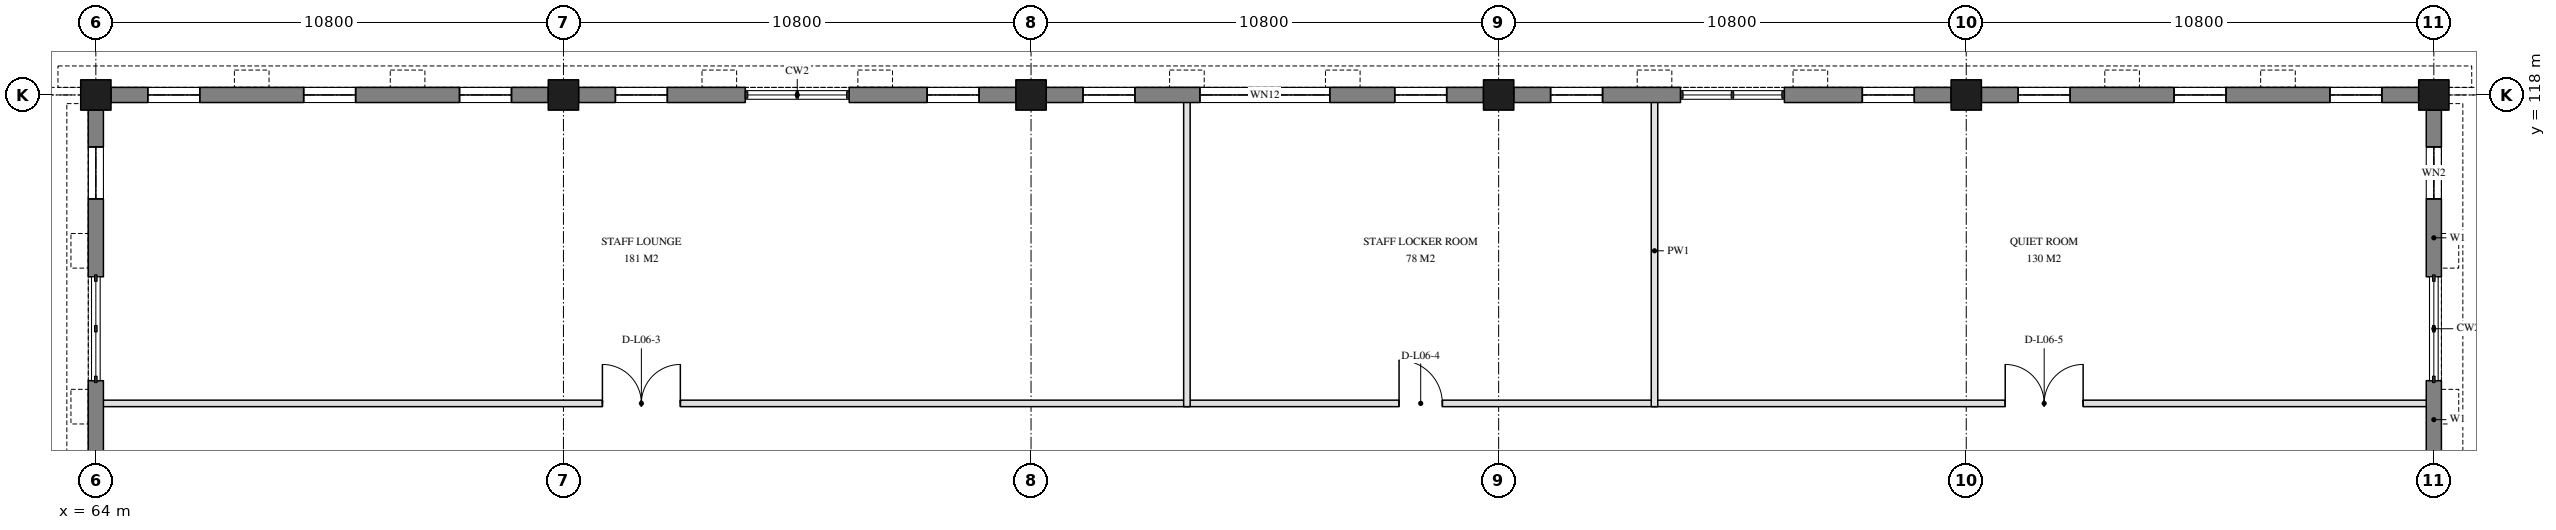
"""IFC4 building model, lengths in metres.
Left out: names, types, materials, properties, quantities, classifications, styles, units other than length and angle.
Written with IfcOpenShell. Run it as: python <this file> out.ifc"""

import sys

from ifc_helpers import new_model, si_unit, direction, frame, frame_2d, origin, origin_2d, place, context, subcontext, project, spatial, rectangle, extrude, element, fill, save


model = new_model("IFC4")
c1 = context("Model", 3, precision=1e-05, world=origin(), true_north=direction((0.0, 1.0)))
c2 = subcontext(c1, "Body", "Model", "MODEL_VIEW")
j1 = project(units=[si_unit("LENGTHUNIT", "METRE"), si_unit("PLANEANGLEUNIT", "RADIAN")], contexts=[c1])
p1 = place(None, origin())
s1 = spatial("IfcSite", under=j1, at=p1, CompositionType="ELEMENT")
p2 = place(p1, origin())
s2 = spatial("IfcBuilding", under=s1, at=p2, CompositionType="ELEMENT")
p3 = place(p2, frame((0.0, 0.0, 24.3)))
s3 = spatial("IfcBuildingStorey", under=s2, at=p3, CompositionType="ELEMENT", Elevation=24.3)
for number, where, z_axis, x_axis in (
    (1, (64.0, 118.0, 0.0), (0.0, 0.0, 1.0), (1.0, 0.0, 0.0)),
    (2, (74.8, 118.0, 0.0), (0.0, 0.0, 1.0), (1.0, 0.0, 0.0)),
    (3, (85.6, 118.0, 0.0), (0.0, 0.0, 1.0), (1.0, 0.0, 0.0)),
    (4, (96.4, 118.0, 0.0), (0.0, 0.0, 1.0), (1.0, 0.0, 0.0)),
    (5, (107.2, 118.0, 0.0), (0.0, 0.0, 1.0), (1.0, 0.0, 0.0)),
    (6, (118.0, 118.0, 0.0), (0.0, 0.0, 1.0), (1.0, 0.0, 0.0)),
):
    element("IfcColumn", number, at=place(p3, frame(where, z_axis=z_axis, x_axis=x_axis)), inside=s3, PredefinedType="COLUMN", context=c2, shape_type="SweptSolid", body=[
        extrude(rectangle(XDim=0.7, YDim=0.7, at=origin_2d()), origin(), (0.0, 0.0, 1.0), 3.9),
    ])
p4 = place(p3, frame((64.35, 118.0, 0.0), z_axis=(0.0, 0.0, 1.0), x_axis=(1.0, 0.0, 0.0)))
e7 = element("IfcWall", 7, at=p4, inside=s3, PredefinedType="SOLIDWALL", context=c2, shape_type="SweptSolid", body=[
    extrude(rectangle(XDim=10.1, YDim=0.35, at=frame_2d((5.05, 0.0))), origin(), (0.0, 0.0, 1.0), 2.95),
])
p5 = place(p4, frame((0.85, 0.0, 0.9)))
e8 = element("IfcOpeningElement", 8, at=p5, cuts=e7, PredefinedType="OPENING", context=c2, shape_type="SweptSolid", body=[
    extrude(rectangle(XDim=1.2, YDim=1.2, at=frame_2d((0.6, 0.6))), frame((0.0, 0.185, 0.0), z_axis=(0.0, -1.0, 0.0), x_axis=(1.0, 0.0, 0.0)), (0.0, 0.0, 1.0), 0.37),
])
p6 = place(p4, frame((4.45, 0.0, 0.9)))
e9 = element("IfcOpeningElement", 9, at=p6, cuts=e7, PredefinedType="OPENING", context=c2, shape_type="SweptSolid", body=[
    extrude(rectangle(XDim=1.2, YDim=1.2, at=frame_2d((0.6, 0.6))), frame((0.0, 0.185, 0.0), z_axis=(0.0, -1.0, 0.0), x_axis=(1.0, 0.0, 0.0)), (0.0, 0.0, 1.0), 0.37),
])
p7 = place(p4, frame((8.05, 0.0, 0.9)))
e10 = element("IfcOpeningElement", 10, at=p7, cuts=e7, PredefinedType="OPENING", context=c2, shape_type="SweptSolid", body=[
    extrude(rectangle(XDim=1.2, YDim=1.2, at=frame_2d((0.6, 0.6))), frame((0.0, 0.185, 0.0), z_axis=(0.0, -1.0, 0.0), x_axis=(1.0, 0.0, 0.0)), (0.0, 0.0, 1.0), 0.37),
])
p8 = place(p3, frame((75.15, 118.0, 0.0), z_axis=(0.0, 0.0, 1.0), x_axis=(1.0, 0.0, 0.0)))
e11 = element("IfcWall", 11, at=p8, inside=s3, PredefinedType="SOLIDWALL", context=c2, shape_type="SweptSolid", body=[
    extrude(rectangle(XDim=3.85, YDim=0.35, at=frame_2d((1.925, 0.0))), origin(), (0.0, 0.0, 1.0), 2.95),
])
p9 = place(p8, frame((0.85, 0.0, 0.9)))
e12 = element("IfcOpeningElement", 12, at=p9, cuts=e11, PredefinedType="OPENING", context=c2, shape_type="SweptSolid", body=[
    extrude(rectangle(XDim=1.2, YDim=1.2, at=frame_2d((0.6, 0.6))), frame((0.0, 0.185, 0.0), z_axis=(0.0, -1.0, 0.0), x_axis=(1.0, 0.0, 0.0)), (0.0, 0.0, 1.0), 0.37),
])
p10 = place(p3, frame((81.4, 118.0, 0.0), z_axis=(0.0, 0.0, 1.0), x_axis=(1.0, 0.0, 0.0)))
e13 = element("IfcWall", 13, at=p10, inside=s3, PredefinedType="SOLIDWALL", context=c2, shape_type="SweptSolid", body=[
    extrude(rectangle(XDim=3.85, YDim=0.35, at=frame_2d((1.925, 0.0))), origin(), (0.0, 0.0, 1.0), 2.95),
])
p11 = place(p10, frame((1.8, 0.0, 0.9)))
e14 = element("IfcOpeningElement", 14, at=p11, cuts=e13, PredefinedType="OPENING", context=c2, shape_type="SweptSolid", body=[
    extrude(rectangle(XDim=1.2, YDim=1.2, at=frame_2d((0.6, 0.6))), frame((0.0, 0.185, 0.0), z_axis=(0.0, -1.0, 0.0), x_axis=(1.0, 0.0, 0.0)), (0.0, 0.0, 1.0), 0.37),
])
p12 = place(p3, frame((85.95, 118.0, 0.0), z_axis=(0.0, 0.0, 1.0), x_axis=(1.0, 0.0, 0.0)))
e15 = element("IfcWall", 15, at=p12, inside=s3, PredefinedType="SOLIDWALL", context=c2, shape_type="SweptSolid", body=[
    extrude(rectangle(XDim=10.1, YDim=0.35, at=frame_2d((5.05, 0.0))), origin(), (0.0, 0.0, 1.0), 2.95),
])
p13 = place(p12, frame((0.85, 0.0, 0.9)))
e16 = element("IfcOpeningElement", 16, at=p13, cuts=e15, PredefinedType="OPENING", context=c2, shape_type="SweptSolid", body=[
    extrude(rectangle(XDim=1.2, YDim=1.2, at=frame_2d((0.6, 0.6))), frame((0.0, 0.185, 0.0), z_axis=(0.0, -1.0, 0.0), x_axis=(1.0, 0.0, 0.0)), (0.0, 0.0, 1.0), 0.37),
])
p14 = place(p12, frame((3.55, 0.0, 0.9)))
e17 = element("IfcOpeningElement", 17, at=p14, cuts=e15, PredefinedType="OPENING", context=c2, shape_type="SweptSolid", body=[
    extrude(rectangle(XDim=3.0, YDim=1.2, at=frame_2d((1.5, 0.6))), frame((0.0, 0.185, 0.0), z_axis=(0.0, -1.0, 0.0), x_axis=(1.0, 0.0, 0.0)), (0.0, 0.0, 1.0), 0.37),
])
p15 = place(p12, frame((8.05, 0.0, 0.9)))
e18 = element("IfcOpeningElement", 18, at=p15, cuts=e15, PredefinedType="OPENING", context=c2, shape_type="SweptSolid", body=[
    extrude(rectangle(XDim=1.2, YDim=1.2, at=frame_2d((0.6, 0.6))), frame((0.0, 0.185, 0.0), z_axis=(0.0, -1.0, 0.0), x_axis=(1.0, 0.0, 0.0)), (0.0, 0.0, 1.0), 0.37),
])
p16 = place(p3, frame((96.75, 118.0, 0.0), z_axis=(0.0, 0.0, 1.0), x_axis=(1.0, 0.0, 0.0)))
e19 = element("IfcWall", 19, at=p16, inside=s3, PredefinedType="SOLIDWALL", context=c2, shape_type="SweptSolid", body=[
    extrude(rectangle(XDim=3.85, YDim=0.35, at=frame_2d((1.925, 0.0))), origin(), (0.0, 0.0, 1.0), 2.95),
])
p17 = place(p16, frame((0.85, 0.0, 0.9)))
e20 = element("IfcOpeningElement", 20, at=p17, cuts=e19, PredefinedType="OPENING", context=c2, shape_type="SweptSolid", body=[
    extrude(rectangle(XDim=1.2, YDim=1.2, at=frame_2d((0.6, 0.6))), frame((0.0, 0.185, 0.0), z_axis=(0.0, -1.0, 0.0), x_axis=(1.0, 0.0, 0.0)), (0.0, 0.0, 1.0), 0.37),
])
p18 = place(p3, frame((103.0, 118.0, 0.0), z_axis=(0.0, 0.0, 1.0), x_axis=(1.0, 0.0, 0.0)))
e21 = element("IfcWall", 21, at=p18, inside=s3, PredefinedType="SOLIDWALL", context=c2, shape_type="SweptSolid", body=[
    extrude(rectangle(XDim=3.85, YDim=0.35, at=frame_2d((1.925, 0.0))), origin(), (0.0, 0.0, 1.0), 2.95),
])
p19 = place(p18, frame((1.8, 0.0, 0.9)))
e22 = element("IfcOpeningElement", 22, at=p19, cuts=e21, PredefinedType="OPENING", context=c2, shape_type="SweptSolid", body=[
    extrude(rectangle(XDim=1.2, YDim=1.2, at=frame_2d((0.6, 0.6))), frame((0.0, 0.185, 0.0), z_axis=(0.0, -1.0, 0.0), x_axis=(1.0, 0.0, 0.0)), (0.0, 0.0, 1.0), 0.37),
])
p20 = place(p3, frame((107.55, 118.0, 0.0), z_axis=(0.0, 0.0, 1.0), x_axis=(1.0, 0.0, 0.0)))
e23 = element("IfcWall", 23, at=p20, inside=s3, PredefinedType="SOLIDWALL", context=c2, shape_type="SweptSolid", body=[
    extrude(rectangle(XDim=10.1, YDim=0.35, at=frame_2d((5.05, 0.0))), origin(), (0.0, 0.0, 1.0), 2.95),
])
p21 = place(p20, frame((0.85, 0.0, 0.9)))
e24 = element("IfcOpeningElement", 24, at=p21, cuts=e23, PredefinedType="OPENING", context=c2, shape_type="SweptSolid", body=[
    extrude(rectangle(XDim=1.2, YDim=1.2, at=frame_2d((0.6, 0.6))), frame((0.0, 0.185, 0.0), z_axis=(0.0, -1.0, 0.0), x_axis=(1.0, 0.0, 0.0)), (0.0, 0.0, 1.0), 0.37),
])
p22 = place(p20, frame((4.45, 0.0, 0.9)))
e25 = element("IfcOpeningElement", 25, at=p22, cuts=e23, PredefinedType="OPENING", context=c2, shape_type="SweptSolid", body=[
    extrude(rectangle(XDim=1.2, YDim=1.2, at=frame_2d((0.6, 0.6))), frame((0.0, 0.185, 0.0), z_axis=(0.0, -1.0, 0.0), x_axis=(1.0, 0.0, 0.0)), (0.0, 0.0, 1.0), 0.37),
])
p23 = place(p20, frame((8.05, 0.0, 0.9)))
e26 = element("IfcOpeningElement", 26, at=p23, cuts=e23, PredefinedType="OPENING", context=c2, shape_type="SweptSolid", body=[
    extrude(rectangle(XDim=1.2, YDim=1.2, at=frame_2d((0.6, 0.6))), frame((0.0, 0.185, 0.0), z_axis=(0.0, -1.0, 0.0), x_axis=(1.0, 0.0, 0.0)), (0.0, 0.0, 1.0), 0.37),
])
p24 = place(p3, frame((64.0, 107.55, 0.0), z_axis=(0.0, 0.0, 1.0), x_axis=(0.0, 1.0, 0.0)))
e27 = element("IfcWall", 27, at=p24, inside=s3, PredefinedType="SOLIDWALL", context=c2, shape_type="SweptSolid", body=[
    extrude(rectangle(XDim=3.85, YDim=0.35, at=frame_2d((1.925, 0.0))), origin(), (0.0, 0.0, 1.0), 2.95),
])
p25 = place(p24, frame((0.85, 0.0, 0.9)))
e28 = element("IfcOpeningElement", 28, at=p25, cuts=e27, PredefinedType="OPENING", context=c2, shape_type="SweptSolid", body=[
    extrude(rectangle(XDim=1.2, YDim=1.2, at=frame_2d((0.6, 0.6))), frame((0.0, 0.185, 0.0), z_axis=(0.0, -1.0, 0.0), x_axis=(1.0, 0.0, 0.0)), (0.0, 0.0, 1.0), 0.37),
])
p26 = place(p3, frame((64.0, 113.8, 0.0), z_axis=(0.0, 0.0, 1.0), x_axis=(0.0, 1.0, 0.0)))
e29 = element("IfcWall", 29, at=p26, inside=s3, PredefinedType="SOLIDWALL", context=c2, shape_type="SweptSolid", body=[
    extrude(rectangle(XDim=3.85, YDim=0.35, at=frame_2d((1.925, 0.0))), origin(), (0.0, 0.0, 1.0), 2.95),
])
p27 = place(p26, frame((1.8, 0.0, 0.9)))
e30 = element("IfcOpeningElement", 30, at=p27, cuts=e29, PredefinedType="OPENING", context=c2, shape_type="SweptSolid", body=[
    extrude(rectangle(XDim=1.2, YDim=1.2, at=frame_2d((0.6, 0.6))), frame((0.0, 0.185, 0.0), z_axis=(0.0, -1.0, 0.0), x_axis=(1.0, 0.0, 0.0)), (0.0, 0.0, 1.0), 0.37),
])
p28 = place(p3, frame((118.0, 107.55, 0.0), z_axis=(0.0, 0.0, 1.0), x_axis=(0.0, 1.0, 0.0)))
e31 = element("IfcWall", 31, at=p28, inside=s3, PredefinedType="SOLIDWALL", context=c2, shape_type="SweptSolid", body=[
    extrude(rectangle(XDim=3.85, YDim=0.35, at=frame_2d((1.925, 0.0))), origin(), (0.0, 0.0, 1.0), 2.95),
])
p29 = place(p28, frame((0.85, 0.0, 0.9)))
e32 = element("IfcOpeningElement", 32, at=p29, cuts=e31, PredefinedType="OPENING", context=c2, shape_type="SweptSolid", body=[
    extrude(rectangle(XDim=1.2, YDim=1.2, at=frame_2d((0.6, 0.6))), frame((0.0, 0.185, 0.0), z_axis=(0.0, -1.0, 0.0), x_axis=(1.0, 0.0, 0.0)), (0.0, 0.0, 1.0), 0.37),
])
p30 = place(p3, frame((118.0, 113.8, 0.0), z_axis=(0.0, 0.0, 1.0), x_axis=(0.0, 1.0, 0.0)))
e33 = element("IfcWall", 33, at=p30, inside=s3, PredefinedType="SOLIDWALL", context=c2, shape_type="SweptSolid", body=[
    extrude(rectangle(XDim=3.85, YDim=0.35, at=frame_2d((1.925, 0.0))), origin(), (0.0, 0.0, 1.0), 2.95),
])
p31 = place(p30, frame((1.8, 0.0, 0.9)))
e34 = element("IfcOpeningElement", 34, at=p31, cuts=e33, PredefinedType="OPENING", context=c2, shape_type="SweptSolid", body=[
    extrude(rectangle(XDim=1.2, YDim=1.2, at=frame_2d((0.6, 0.6))), frame((0.0, 0.185, 0.0), z_axis=(0.0, -1.0, 0.0), x_axis=(1.0, 0.0, 0.0)), (0.0, 0.0, 1.0), 0.37),
])
p32 = place(p3, frame((64.0, 110.875, 0.0), z_axis=(0.0, 0.0, 1.0), x_axis=(1.0, 0.0, 0.0)))
e35 = element("IfcWall", 35, at=p32, inside=s3, PredefinedType="PARTITIONING", context=c2, shape_type="SweptSolid", body=[
    extrude(rectangle(XDim=25.2, YDim=0.15, at=frame_2d((12.6, 0.0))), origin(), (0.0, 0.0, 1.0), 2.95),
])
p33 = place(p32, frame((11.7, 0.0, 0.0)))
e36 = element("IfcOpeningElement", 36, at=p33, cuts=e35, PredefinedType="OPENING", context=c2, shape_type="SweptSolid", body=[
    extrude(rectangle(XDim=1.8, YDim=2.1, at=frame_2d((0.9, 1.05))), frame((0.0, 0.085, 0.0), z_axis=(0.0, -1.0, 0.0), x_axis=(1.0, 0.0, 0.0)), (0.0, 0.0, 1.0), 0.17),
])
p34 = place(p3, frame((89.2, 110.875, 0.0), z_axis=(0.0, 0.0, 1.0), x_axis=(1.0, 0.0, 0.0)))
e37 = element("IfcWall", 37, at=p34, inside=s3, PredefinedType="PARTITIONING", context=c2, shape_type="SweptSolid", body=[
    extrude(rectangle(XDim=10.8, YDim=0.15, at=frame_2d((5.4, 0.0))), origin(), (0.0, 0.0, 1.0), 3.235),
])
p35 = place(p34, frame((4.9, 0.0, 0.0)))
e38 = element("IfcOpeningElement", 38, at=p35, cuts=e37, PredefinedType="OPENING", context=c2, shape_type="SweptSolid", body=[
    extrude(rectangle(XDim=1.0, YDim=2.1, at=frame_2d((0.5, 1.05))), frame((0.0, 0.085, 0.0), z_axis=(0.0, -1.0, 0.0), x_axis=(1.0, 0.0, 0.0)), (0.0, 0.0, 1.0), 0.17),
])
p36 = place(p3, frame((100.0, 110.875, 0.0), z_axis=(0.0, 0.0, 1.0), x_axis=(1.0, 0.0, 0.0)))
e39 = element("IfcWall", 39, at=p36, inside=s3, PredefinedType="PARTITIONING", context=c2, shape_type="SweptSolid", body=[
    extrude(rectangle(XDim=18.0, YDim=0.15, at=frame_2d((9.0, 0.0))), origin(), (0.0, 0.0, 1.0), 2.95),
])
p37 = place(p36, frame((8.1, 0.0, 0.0)))
e40 = element("IfcOpeningElement", 40, at=p37, cuts=e39, PredefinedType="OPENING", context=c2, shape_type="SweptSolid", body=[
    extrude(rectangle(XDim=1.8, YDim=2.1, at=frame_2d((0.9, 1.05))), frame((0.0, 0.085, 0.0), z_axis=(0.0, -1.0, 0.0), x_axis=(1.0, 0.0, 0.0)), (0.0, 0.0, 1.0), 0.17),
])
for number, where, z_axis, x_axis in (
    (41, (89.2, 110.8, 0.0), (0.0, 0.0, 1.0), (0.0, 1.0, 0.0)),
    (42, (100.0, 110.8, 0.0), (0.0, 0.0, 1.0), (0.0, 1.0, 0.0)),
):
    element("IfcWall", number, at=place(p3, frame(where, z_axis=z_axis, x_axis=x_axis)), inside=s3, PredefinedType="PARTITIONING", context=c2, shape_type="SweptSolid", body=[
        extrude(rectangle(XDim=7.2, YDim=0.15, at=frame_2d((3.6, 0.0))), origin(), (0.0, 0.0, 1.0), 2.95),
    ])
p38 = place(p5, origin())
e43 = element("IfcWindow", 43, at=p38, inside=s3, PartitioningType="SINGLE_PANEL", PredefinedType="WINDOW", context=c2, shape_type="SweptSolid", body=[
    extrude(rectangle(XDim=1.2, YDim=1.2, at=frame_2d((0.6, 0.6))), frame((0.0, 0.03, 0.0), z_axis=(0.0, -1.0, 0.0), x_axis=(1.0, 0.0, 0.0)), (0.0, 0.0, 1.0), 0.06),
])
fill(e8, e43)
p39 = place(p6, origin())
e44 = element("IfcWindow", 44, at=p39, inside=s3, PartitioningType="SINGLE_PANEL", PredefinedType="WINDOW", context=c2, shape_type="SweptSolid", body=[
    extrude(rectangle(XDim=1.2, YDim=1.2, at=frame_2d((0.6, 0.6))), frame((0.0, 0.03, 0.0), z_axis=(0.0, -1.0, 0.0), x_axis=(1.0, 0.0, 0.0)), (0.0, 0.0, 1.0), 0.06),
])
fill(e9, e44)
p40 = place(p7, origin())
e45 = element("IfcWindow", 45, at=p40, inside=s3, PartitioningType="SINGLE_PANEL", PredefinedType="WINDOW", context=c2, shape_type="SweptSolid", body=[
    extrude(rectangle(XDim=1.2, YDim=1.2, at=frame_2d((0.6, 0.6))), frame((0.0, 0.03, 0.0), z_axis=(0.0, -1.0, 0.0), x_axis=(1.0, 0.0, 0.0)), (0.0, 0.0, 1.0), 0.06),
])
fill(e10, e45)
p41 = place(p9, origin())
e46 = element("IfcWindow", 46, at=p41, inside=s3, PartitioningType="SINGLE_PANEL", PredefinedType="WINDOW", context=c2, shape_type="SweptSolid", body=[
    extrude(rectangle(XDim=1.2, YDim=1.2, at=frame_2d((0.6, 0.6))), frame((0.0, 0.03, 0.0), z_axis=(0.0, -1.0, 0.0), x_axis=(1.0, 0.0, 0.0)), (0.0, 0.0, 1.0), 0.06),
])
fill(e12, e46)
p42 = place(p11, origin())
e47 = element("IfcWindow", 47, at=p42, inside=s3, PartitioningType="SINGLE_PANEL", PredefinedType="WINDOW", context=c2, shape_type="SweptSolid", body=[
    extrude(rectangle(XDim=1.2, YDim=1.2, at=frame_2d((0.6, 0.6))), frame((0.0, 0.03, 0.0), z_axis=(0.0, -1.0, 0.0), x_axis=(1.0, 0.0, 0.0)), (0.0, 0.0, 1.0), 0.06),
])
fill(e14, e47)
p43 = place(p13, origin())
e48 = element("IfcWindow", 48, at=p43, inside=s3, PartitioningType="SINGLE_PANEL", PredefinedType="WINDOW", context=c2, shape_type="SweptSolid", body=[
    extrude(rectangle(XDim=1.2, YDim=1.2, at=frame_2d((0.6, 0.6))), frame((0.0, 0.03, 0.0), z_axis=(0.0, -1.0, 0.0), x_axis=(1.0, 0.0, 0.0)), (0.0, 0.0, 1.0), 0.06),
])
fill(e16, e48)
p44 = place(p14, origin())
e49 = element("IfcWindow", 49, at=p44, inside=s3, PartitioningType="SINGLE_PANEL", PredefinedType="WINDOW", context=c2, shape_type="SweptSolid", body=[
    extrude(rectangle(XDim=3.0, YDim=1.2, at=frame_2d((1.5, 0.6))), frame((0.0, 0.03, 0.0), z_axis=(0.0, -1.0, 0.0), x_axis=(1.0, 0.0, 0.0)), (0.0, 0.0, 1.0), 0.06),
])
fill(e17, e49)
p45 = place(p15, origin())
e50 = element("IfcWindow", 50, at=p45, inside=s3, PartitioningType="SINGLE_PANEL", PredefinedType="WINDOW", context=c2, shape_type="SweptSolid", body=[
    extrude(rectangle(XDim=1.2, YDim=1.2, at=frame_2d((0.6, 0.6))), frame((0.0, 0.03, 0.0), z_axis=(0.0, -1.0, 0.0), x_axis=(1.0, 0.0, 0.0)), (0.0, 0.0, 1.0), 0.06),
])
fill(e18, e50)
p46 = place(p17, origin())
e51 = element("IfcWindow", 51, at=p46, inside=s3, PartitioningType="SINGLE_PANEL", PredefinedType="WINDOW", context=c2, shape_type="SweptSolid", body=[
    extrude(rectangle(XDim=1.2, YDim=1.2, at=frame_2d((0.6, 0.6))), frame((0.0, 0.03, 0.0), z_axis=(0.0, -1.0, 0.0), x_axis=(1.0, 0.0, 0.0)), (0.0, 0.0, 1.0), 0.06),
])
fill(e20, e51)
p47 = place(p19, origin())
e52 = element("IfcWindow", 52, at=p47, inside=s3, PartitioningType="SINGLE_PANEL", PredefinedType="WINDOW", context=c2, shape_type="SweptSolid", body=[
    extrude(rectangle(XDim=1.2, YDim=1.2, at=frame_2d((0.6, 0.6))), frame((0.0, 0.03, 0.0), z_axis=(0.0, -1.0, 0.0), x_axis=(1.0, 0.0, 0.0)), (0.0, 0.0, 1.0), 0.06),
])
fill(e22, e52)
p48 = place(p21, origin())
e53 = element("IfcWindow", 53, at=p48, inside=s3, PartitioningType="SINGLE_PANEL", PredefinedType="WINDOW", context=c2, shape_type="SweptSolid", body=[
    extrude(rectangle(XDim=1.2, YDim=1.2, at=frame_2d((0.6, 0.6))), frame((0.0, 0.03, 0.0), z_axis=(0.0, -1.0, 0.0), x_axis=(1.0, 0.0, 0.0)), (0.0, 0.0, 1.0), 0.06),
])
fill(e24, e53)
p49 = place(p22, origin())
e54 = element("IfcWindow", 54, at=p49, inside=s3, PartitioningType="SINGLE_PANEL", PredefinedType="WINDOW", context=c2, shape_type="SweptSolid", body=[
    extrude(rectangle(XDim=1.2, YDim=1.2, at=frame_2d((0.6, 0.6))), frame((0.0, 0.03, 0.0), z_axis=(0.0, -1.0, 0.0), x_axis=(1.0, 0.0, 0.0)), (0.0, 0.0, 1.0), 0.06),
])
fill(e25, e54)
p50 = place(p23, origin())
e55 = element("IfcWindow", 55, at=p50, inside=s3, PartitioningType="SINGLE_PANEL", PredefinedType="WINDOW", context=c2, shape_type="SweptSolid", body=[
    extrude(rectangle(XDim=1.2, YDim=1.2, at=frame_2d((0.6, 0.6))), frame((0.0, 0.03, 0.0), z_axis=(0.0, -1.0, 0.0), x_axis=(1.0, 0.0, 0.0)), (0.0, 0.0, 1.0), 0.06),
])
fill(e26, e55)
p51 = place(p27, origin())
e56 = element("IfcWindow", 56, at=p51, inside=s3, PartitioningType="SINGLE_PANEL", PredefinedType="WINDOW", context=c2, shape_type="SweptSolid", body=[
    extrude(rectangle(XDim=1.2, YDim=1.2, at=frame_2d((0.6, 0.6))), frame((0.0, 0.03, 0.0), z_axis=(0.0, -1.0, 0.0), x_axis=(1.0, 0.0, 0.0)), (0.0, 0.0, 1.0), 0.06),
])
fill(e30, e56)
p52 = place(p31, origin())
e57 = element("IfcWindow", 57, at=p52, inside=s3, PartitioningType="SINGLE_PANEL", PredefinedType="WINDOW", context=c2, shape_type="SweptSolid", body=[
    extrude(rectangle(XDim=1.2, YDim=1.2, at=frame_2d((0.6, 0.6))), frame((0.0, 0.03, 0.0), z_axis=(0.0, -1.0, 0.0), x_axis=(1.0, 0.0, 0.0)), (0.0, 0.0, 1.0), 0.06),
])
fill(e34, e57)
p53 = place(p33, origin())
e58 = element("IfcDoor", 58, at=p53, inside=s3, OperationType="DOUBLE_DOOR_DOUBLE_SWING", PredefinedType="DOOR", context=c2, shape_type="SweptSolid", body=[
    extrude(rectangle(XDim=1.8, YDim=2.1, at=frame_2d((0.9, 1.05))), frame((0.0, 0.025, 0.0), z_axis=(0.0, -1.0, 0.0), x_axis=(1.0, 0.0, 0.0)), (0.0, 0.0, 1.0), 0.05),
])
fill(e36, e58)
p54 = place(p35, origin())
e59 = element("IfcDoor", 59, at=p54, inside=s3, OperationType="SINGLE_SWING_LEFT", PredefinedType="DOOR", context=c2, shape_type="SweptSolid", body=[
    extrude(rectangle(XDim=1.0, YDim=2.1, at=frame_2d((0.5, 1.05))), frame((0.0, 0.025, 0.0), z_axis=(0.0, -1.0, 0.0), x_axis=(1.0, 0.0, 0.0)), (0.0, 0.0, 1.0), 0.05),
])
fill(e38, e59)
p55 = place(p37, origin())
e60 = element("IfcDoor", 60, at=p55, inside=s3, OperationType="DOUBLE_DOOR_DOUBLE_SWING", PredefinedType="DOOR", context=c2, shape_type="SweptSolid", body=[
    extrude(rectangle(XDim=1.8, YDim=2.1, at=frame_2d((0.9, 1.05))), frame((0.0, 0.025, 0.0), z_axis=(0.0, -1.0, 0.0), x_axis=(1.0, 0.0, 0.0)), (0.0, 0.0, 1.0), 0.05),
])
fill(e40, e60)
save(model, sys.argv[1])
